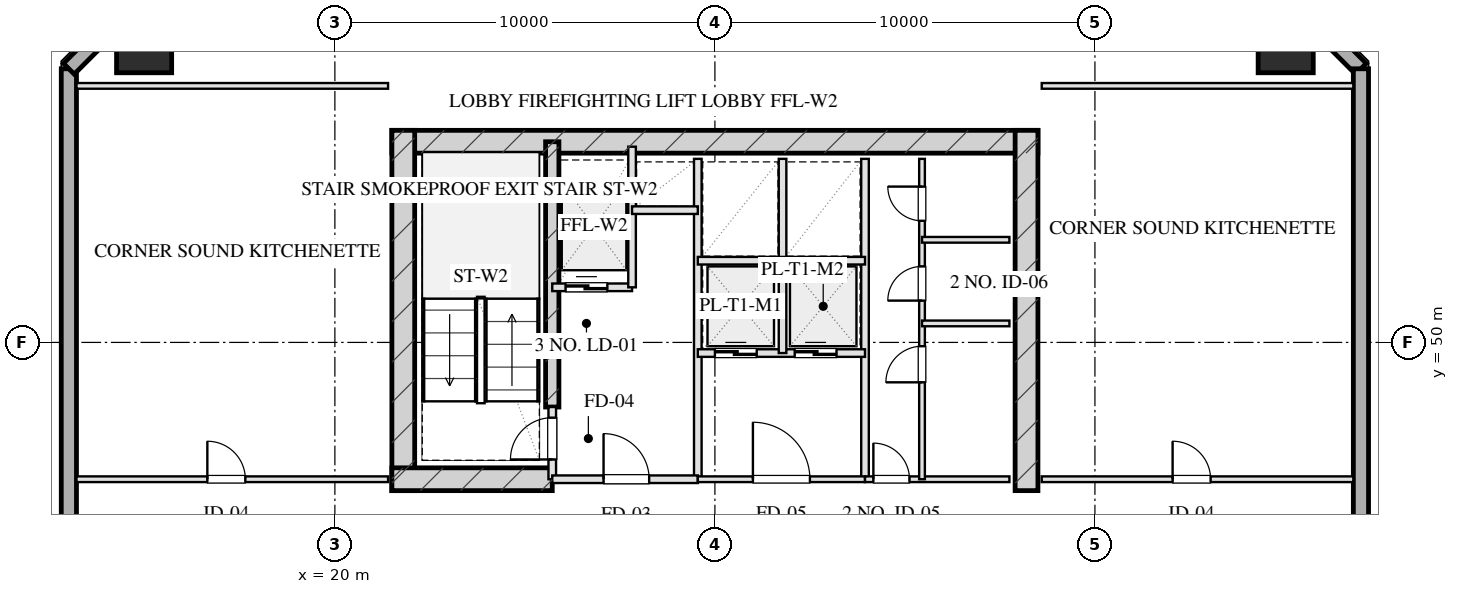
"""IFC4 building model, lengths in metres.
Left out: names, types, materials, properties, quantities, classifications, styles, units other than length and angle.
Written with IfcOpenShell. Run it as: python <this file> out.ifc"""

import sys

from ifc_helpers import new_model, si_unit, direction, frame, frame_2d, origin, origin_2d, place, context, subcontext, project, spatial, rectangle, hollow_rectangle, extrude, element, fill, save


model = new_model("IFC4")
c1 = context("Model", 3, precision=1e-05, world=origin(), true_north=direction((0.0, 1.0)))
c2 = subcontext(c1, "Body", "Model", "MODEL_VIEW")
j1 = project(units=[si_unit("LENGTHUNIT", "METRE"), si_unit("PLANEANGLEUNIT", "RADIAN")], contexts=[c1])
p1 = place(None, origin())
s1 = spatial("IfcSite", under=j1, at=p1, CompositionType="ELEMENT")
p2 = place(p1, origin())
s2 = spatial("IfcBuilding", under=s1, at=p2, CompositionType="ELEMENT")
p3 = place(p2, frame((0.0, 0.0, 173.65)))
s3 = spatial("IfcBuildingStorey", under=s2, at=p3, CompositionType="ELEMENT", Elevation=173.65)
p4 = place(p3, frame((21.5, 55.28, 0.0), z_axis=(0.0, 0.0, 1.0), x_axis=(1.0, 0.0, 0.0)))
e1 = element("IfcWall", 1, at=p4, inside=s3, PredefinedType="SHEAR", context=c2, shape_type="SweptSolid", body=[
    extrude(rectangle(XDim=17.0, YDim=0.6, at=frame_2d((8.5, 0.0))), origin(), (0.0, 0.0, 1.0), 3.45),
])
for number, where, z_axis, x_axis in (
    (2, (21.8, 46.1, 0.0), (0.0, 0.0, 1.0), (0.0, 1.0, 0.0)),
    (3, (38.2, 46.1, 0.0), (0.0, 0.0, 1.0), (0.0, 1.0, 0.0)),
):
    element("IfcWall", number, at=place(p3, frame(where, z_axis=z_axis, x_axis=x_axis)), inside=s3, PredefinedType="SHEAR", context=c2, shape_type="SweptSolid", body=[
        extrude(rectangle(XDim=9.48, YDim=0.6, at=frame_2d((4.74, 0.0))), origin(), (0.0, 0.0, 1.0), 3.45),
    ])
p5 = place(p3, frame((25.72, 48.3, 0.0), z_axis=(0.0, 0.0, 1.0), x_axis=(0.0, 1.0, 0.0)))
e4 = element("IfcWall", 4, at=p5, inside=s3, PredefinedType="SHEAR", context=c2, shape_type="SweptSolid", body=[
    extrude(rectangle(XDim=6.98, YDim=0.35, at=frame_2d((3.49, 0.0))), origin(), (0.0, 0.0, 1.0), 3.45),
])
p6 = place(p3, frame((21.5, 46.4, 0.0), z_axis=(0.0, 0.0, 1.0), x_axis=(1.0, 0.0, 0.0)))
e5 = element("IfcWall", 5, at=p6, inside=s3, PredefinedType="SHEAR", context=c2, shape_type="SweptSolid", body=[
    extrude(rectangle(XDim=4.22, YDim=0.6, at=frame_2d((2.11, 0.0))), origin(), (0.0, 0.0, 1.0), 3.45),
])
for number, where, z_axis, x_axis in (
    (6, (45.02, 57.82, 0.0), (0.0, 0.0, 1.0), (1.0, 0.0, 0.0)),
    (7, (14.98, 57.82, 0.0), (0.0, 0.0, 1.0), (1.0, 0.0, 0.0)),
):
    element("IfcColumn", number, at=place(p3, frame(where, z_axis=z_axis, x_axis=x_axis)), inside=s3, PredefinedType="COLUMN", context=c2, shape_type="SweptSolid", body=[
        extrude(hollow_rectangle(XDim=1.45, YDim=1.45, WallThickness=0.05, at=origin_2d()), origin(), (0.0, 0.0, 1.0), 3.451),
    ])
p7 = place(p3, frame((13.0, 10.8, 0.0), z_axis=(0.0, 0.0, 1.0), x_axis=(0.0, 1.0, 0.0)))
e8 = element("IfcWall", 8, at=p7, inside=s3, PredefinedType="SOLIDWALL", context=c2, shape_type="SweptSolid", body=[
    extrude(rectangle(XDim=46.4, YDim=0.4, at=frame_2d((23.2, 0.0))), origin(), (0.0, 0.0, 1.0), 2.61),
])
p8 = place(p7, frame((16.85, 0.0, 0.0)))
e9 = element("IfcOpeningElement", 9, at=p8, cuts=e8, PredefinedType="OPENING", context=c2, shape_type="SweptSolid", body=[
    extrude(rectangle(XDim=1.1, YDim=2.15, at=frame_2d((0.55, 1.075))), frame((0.0, 0.21, 0.0), z_axis=(0.0, -1.0, 0.0), x_axis=(1.0, 0.0, 0.0)), (0.0, 0.0, 1.0), 0.42),
])
for number, where, z_axis, x_axis in (
    (10, (13.0, 57.2, 0.0), (0.0, 0.0, 1.0), (0.707, 0.707, 0.0)),
    (11, (44.4, 59.8, 0.0), (0.0, 0.0, 1.0), (0.707, -0.707, 0.0)),
):
    element("IfcWall", number, at=place(p3, frame(where, z_axis=z_axis, x_axis=x_axis)), inside=s3, PredefinedType="SOLIDWALL", context=c2, shape_type="SweptSolid", body=[
        extrude(rectangle(XDim=3.677, YDim=0.4, at=frame_2d((1.838, 0.0))), origin(), (0.0, 0.0, 1.0), 2.61),
    ])
p9 = place(p3, frame((47.0, 57.2, 0.0), z_axis=(0.0, 0.0, 1.0), x_axis=(0.0, -1.0, 0.0)))
e12 = element("IfcWall", 12, at=p9, inside=s3, PredefinedType="SOLIDWALL", context=c2, shape_type="SweptSolid", body=[
    extrude(rectangle(XDim=46.4, YDim=0.4, at=frame_2d((23.2, 0.0))), origin(), (0.0, 0.0, 1.0), 2.61),
])
p10 = place(p9, frame((19.475, 0.0, 0.75)))
e13 = element("IfcOpeningElement", 13, at=p10, cuts=e12, PredefinedType="OPENING", context=c2, shape_type="SweptSolid", body=[
    extrude(rectangle(XDim=2.25, YDim=1.46, at=frame_2d((1.125, 0.73))), frame((0.0, 0.21, 0.0), z_axis=(0.0, -1.0, 0.0), x_axis=(1.0, 0.0, 0.0)), (0.0, 0.0, 1.0), 0.42),
])
p11 = place(p9, frame((15.675, 0.0, 0.75)))
e14 = element("IfcOpeningElement", 14, at=p11, cuts=e12, PredefinedType="OPENING", context=c2, shape_type="SweptSolid", body=[
    extrude(rectangle(XDim=2.25, YDim=1.46, at=frame_2d((1.125, 0.73))), frame((0.0, 0.21, 0.0), z_axis=(0.0, -1.0, 0.0), x_axis=(1.0, 0.0, 0.0)), (0.0, 0.0, 1.0), 0.42),
])
p12 = place(p9, frame((27.05, 0.0, 0.0)))
e15 = element("IfcOpeningElement", 15, at=p12, cuts=e12, PredefinedType="OPENING", context=c2, shape_type="SweptSolid", body=[
    extrude(rectangle(XDim=1.1, YDim=2.15, at=frame_2d((0.55, 1.075))), frame((0.0, 0.21, 0.0), z_axis=(0.0, -1.0, 0.0), x_axis=(1.0, 0.0, 0.0)), (0.0, 0.0, 1.0), 0.42),
])
p13 = place(p3, frame((25.72, 46.4, 0.0), z_axis=(0.0, 0.0, 1.0), x_axis=(0.0, 1.0, 0.0)))
e16 = element("IfcWall", 16, at=p13, inside=s3, PredefinedType="PARTITIONING", context=c2, shape_type="SweptSolid", body=[
    extrude(rectangle(XDim=1.9, YDim=0.2, at=frame_2d((0.95, 0.0))), origin(), (0.0, 0.0, 1.0), 3.175),
])
p14 = place(p13, frame((0.52, 0.0, 0.0)))
e17 = element("IfcOpeningElement", 17, at=p14, cuts=e16, PredefinedType="OPENING", context=c2, shape_type="SweptSolid", body=[
    extrude(rectangle(XDim=1.1, YDim=2.05, at=frame_2d((0.55, 1.025))), frame((0.0, 0.11, 0.0), z_axis=(0.0, -1.0, 0.0), x_axis=(1.0, 0.0, 0.0)), (0.0, 0.0, 1.0), 0.22),
])
p15 = place(p3, frame((29.55, 46.4, 0.0), z_axis=(0.0, 0.0, 1.0), x_axis=(0.0, 1.0, 0.0)))
e18 = element("IfcWall", 18, at=p15, inside=s3, PredefinedType="PARTITIONING", context=c2, shape_type="SweptSolid", body=[
    extrude(rectangle(XDim=8.43, YDim=0.2, at=frame_2d((4.215, 0.0))), origin(), (0.0, 0.0, 1.0), 3.175),
])
p16 = place(p3, frame((25.72, 46.4, 0.0), z_axis=(0.0, 0.0, 1.0), x_axis=(1.0, 0.0, 0.0)))
e19 = element("IfcWall", 19, at=p16, inside=s3, PredefinedType="PARTITIONING", context=c2, shape_type="SweptSolid", body=[
    extrude(rectangle(XDim=3.83, YDim=0.2, at=frame_2d((1.915, 0.0))), origin(), (0.0, 0.0, 1.0), 3.175),
])
p17 = place(p16, frame((1.35, 0.0, 0.0)))
e20 = element("IfcOpeningElement", 20, at=p17, cuts=e19, PredefinedType="OPENING", context=c2, shape_type="SweptSolid", body=[
    extrude(rectangle(XDim=1.2, YDim=2.05, at=frame_2d((0.6, 1.025))), frame((0.0, 0.11, 0.0), z_axis=(0.0, -1.0, 0.0), x_axis=(1.0, 0.0, 0.0)), (0.0, 0.0, 1.0), 0.22),
])
p18 = place(p3, frame((25.72, 51.45, 0.0), z_axis=(0.0, 0.0, 1.0), x_axis=(1.0, 0.0, 0.0)))
e21 = element("IfcWall", 21, at=p18, inside=s3, PredefinedType="PARTITIONING", context=c2, shape_type="SweptSolid", body=[
    extrude(rectangle(XDim=2.1, YDim=0.2, at=frame_2d((1.05, 0.0))), origin(), (0.0, 0.0, 1.0), 3.175),
])
p19 = place(p18, frame((0.35, 0.0, 0.0)))
e22 = element("IfcOpeningElement", 22, at=p19, cuts=e21, PredefinedType="OPENING", context=c2, shape_type="SweptSolid", body=[
    extrude(rectangle(XDim=1.1, YDim=2.05, at=frame_2d((0.55, 1.025))), frame((0.0, 0.11, 0.0), z_axis=(0.0, -1.0, 0.0), x_axis=(1.0, 0.0, 0.0)), (0.0, 0.0, 1.0), 0.22),
])
p20 = place(p3, frame((27.82, 51.45, 0.0), z_axis=(0.0, 0.0, 1.0), x_axis=(0.0, 1.0, 0.0)))
e23 = element("IfcWall", 23, at=p20, inside=s3, PredefinedType="PARTITIONING", context=c2, shape_type="SweptSolid", body=[
    extrude(rectangle(XDim=3.7, YDim=0.2, at=frame_2d((1.85, 0.0))), origin(), (0.0, 0.0, 1.0), 3.175),
])
p21 = place(p3, frame((27.82, 53.48, 0.0), z_axis=(0.0, 0.0, 1.0), x_axis=(1.0, 0.0, 0.0)))
e24 = element("IfcWall", 24, at=p21, inside=s3, PredefinedType="PARTITIONING", context=c2, shape_type="SweptSolid", body=[
    extrude(rectangle(XDim=1.73, YDim=0.2, at=frame_2d((0.865, 0.0))), origin(), (0.0, 0.0, 1.0), 3.175),
])
p22 = place(p3, frame((33.95, 46.4, 0.0), z_axis=(0.0, 0.0, 1.0), x_axis=(0.0, 1.0, 0.0)))
e25 = element("IfcWall", 25, at=p22, inside=s3, PredefinedType="PARTITIONING", context=c2, shape_type="SweptSolid", body=[
    extrude(rectangle(XDim=8.43, YDim=0.2, at=frame_2d((4.215, 0.0))), origin(), (0.0, 0.0, 1.0), 3.175),
])
p23 = place(p3, frame((29.55, 46.4, 0.0), z_axis=(0.0, 0.0, 1.0), x_axis=(1.0, 0.0, 0.0)))
e26 = element("IfcWall", 26, at=p23, inside=s3, PredefinedType="PARTITIONING", context=c2, shape_type="SweptSolid", body=[
    extrude(rectangle(XDim=4.4, YDim=0.15, at=frame_2d((2.2, 0.0))), origin(), (0.0, 0.0, 1.0), 3.175),
])
p24 = place(p23, frame((1.45, 0.0, 0.0)))
e27 = element("IfcOpeningElement", 27, at=p24, cuts=e26, PredefinedType="OPENING", context=c2, shape_type="SweptSolid", body=[
    extrude(rectangle(XDim=1.5, YDim=2.05, at=frame_2d((0.75, 1.025))), frame((0.0, 0.085, 0.0), z_axis=(0.0, -1.0, 0.0), x_axis=(1.0, 0.0, 0.0)), (0.0, 0.0, 1.0), 0.17),
])
p25 = place(p3, frame((29.55, 49.72, 0.0), z_axis=(0.0, 0.0, 1.0), x_axis=(1.0, 0.0, 0.0)))
e28 = element("IfcWall", 28, at=p25, inside=s3, PredefinedType="PARTITIONING", context=c2, shape_type="SweptSolid", body=[
    extrude(rectangle(XDim=4.4, YDim=0.2, at=frame_2d((2.2, 0.0))), origin(), (0.0, 0.0, 1.0), 3.175),
])
p26 = place(p25, frame((0.45, 0.0, 0.0)))
e29 = element("IfcOpeningElement", 29, at=p26, cuts=e28, PredefinedType="OPENING", context=c2, shape_type="SweptSolid", body=[
    extrude(rectangle(XDim=1.1, YDim=2.05, at=frame_2d((0.55, 1.025))), frame((0.0, 0.11, 0.0), z_axis=(0.0, -1.0, 0.0), x_axis=(1.0, 0.0, 0.0)), (0.0, 0.0, 1.0), 0.22),
])
p27 = place(p25, frame((2.55, 0.0, 0.0)))
e30 = element("IfcOpeningElement", 30, at=p27, cuts=e28, PredefinedType="OPENING", context=c2, shape_type="SweptSolid", body=[
    extrude(rectangle(XDim=1.1, YDim=2.05, at=frame_2d((0.55, 1.025))), frame((0.0, 0.11, 0.0), z_axis=(0.0, -1.0, 0.0), x_axis=(1.0, 0.0, 0.0)), (0.0, 0.0, 1.0), 0.22),
])
p28 = place(p3, frame((31.78, 49.72, 0.0), z_axis=(0.0, 0.0, 1.0), x_axis=(0.0, 1.0, 0.0)))
e31 = element("IfcWall", 31, at=p28, inside=s3, PredefinedType="PARTITIONING", context=c2, shape_type="SweptSolid", body=[
    extrude(rectangle(XDim=5.11, YDim=0.2, at=frame_2d((2.555, 0.0))), origin(), (0.0, 0.0, 1.0), 3.175),
])
p29 = place(p3, frame((29.55, 52.15, 0.0), z_axis=(0.0, 0.0, 1.0), x_axis=(1.0, 0.0, 0.0)))
e32 = element("IfcWall", 32, at=p29, inside=s3, PredefinedType="PARTITIONING", context=c2, shape_type="SweptSolid", body=[
    extrude(rectangle(XDim=4.4, YDim=0.2, at=frame_2d((2.2, 0.0))), origin(), (0.0, 0.0, 1.0), 3.175),
])
p30 = place(p3, frame((33.95, 46.4, 0.0), z_axis=(0.0, 0.0, 1.0), x_axis=(1.0, 0.0, 0.0)))
e33 = element("IfcWall", 33, at=p30, inside=s3, PredefinedType="PARTITIONING", context=c2, shape_type="SweptSolid", body=[
    extrude(rectangle(XDim=3.8, YDim=0.15, at=frame_2d((1.9, 0.0))), origin(), (0.0, 0.0, 1.0), 3.175),
])
p31 = place(p30, frame((0.22, 0.0, 0.0)))
e34 = element("IfcOpeningElement", 34, at=p31, cuts=e33, PredefinedType="OPENING", context=c2, shape_type="SweptSolid", body=[
    extrude(rectangle(XDim=0.95, YDim=2.05, at=frame_2d((0.475, 1.025))), frame((0.0, 0.085, 0.0), z_axis=(0.0, -1.0, 0.0), x_axis=(1.0, 0.0, 0.0)), (0.0, 0.0, 1.0), 0.17),
])
p32 = place(p3, frame((35.45, 46.4, 0.0), z_axis=(0.0, 0.0, 1.0), x_axis=(0.0, 1.0, 0.0)))
e35 = element("IfcWall", 35, at=p32, inside=s3, PredefinedType="PARTITIONING", context=c2, shape_type="SweptSolid", body=[
    extrude(rectangle(XDim=8.43, YDim=0.15, at=frame_2d((4.215, 0.0))), origin(), (0.0, 0.0, 1.0), 2.765),
])
p33 = place(p32, frame((2.55, 0.0, 0.0)))
e36 = element("IfcOpeningElement", 36, at=p33, cuts=e35, PredefinedType="OPENING", context=c2, shape_type="SweptSolid", body=[
    extrude(rectangle(XDim=0.95, YDim=2.05, at=frame_2d((0.475, 1.025))), frame((0.0, 0.085, 0.0), z_axis=(0.0, -1.0, 0.0), x_axis=(1.0, 0.0, 0.0)), (0.0, 0.0, 1.0), 0.17),
])
p34 = place(p32, frame((4.7, 0.0, 0.0)))
e37 = element("IfcOpeningElement", 37, at=p34, cuts=e35, PredefinedType="OPENING", context=c2, shape_type="SweptSolid", body=[
    extrude(rectangle(XDim=0.9, YDim=2.05, at=frame_2d((0.45, 1.025))), frame((0.0, 0.085, 0.0), z_axis=(0.0, -1.0, 0.0), x_axis=(1.0, 0.0, 0.0)), (0.0, 0.0, 1.0), 0.17),
])
p35 = place(p32, frame((6.8, 0.0, 0.0)))
e38 = element("IfcOpeningElement", 38, at=p35, cuts=e35, PredefinedType="OPENING", context=c2, shape_type="SweptSolid", body=[
    extrude(rectangle(XDim=0.9, YDim=2.05, at=frame_2d((0.45, 1.025))), frame((0.0, 0.085, 0.0), z_axis=(0.0, -1.0, 0.0), x_axis=(1.0, 0.0, 0.0)), (0.0, 0.0, 1.0), 0.17),
])
for number, where, z_axis, x_axis in (
    (39, (35.45, 50.5, 0.0), (0.0, 0.0, 1.0), (1.0, 0.0, 0.0)),
    (40, (35.45, 52.7, 0.0), (0.0, 0.0, 1.0), (1.0, 0.0, 0.0)),
):
    element("IfcWall", number, at=place(p3, frame(where, z_axis=z_axis, x_axis=x_axis)), inside=s3, PredefinedType="PARTITIONING", context=c2, shape_type="SweptSolid", body=[
        extrude(rectangle(XDim=2.3, YDim=0.15, at=frame_2d((1.15, 0.0))), origin(), (0.0, 0.0, 1.0), 3.175),
    ])
p36 = place(p3, frame((13.2, 56.75, 0.0), z_axis=(0.0, 0.0, 1.0), x_axis=(1.0, 0.0, 0.0)))
e41 = element("IfcWall", 41, at=p36, inside=s3, PredefinedType="PARTITIONING", context=c2, shape_type="SweptSolid", body=[
    extrude(rectangle(XDim=8.2, YDim=0.15, at=frame_2d((4.1, 0.0))), origin(), (0.0, 0.0, 1.0), 3.175),
])
p37 = place(p3, frame((13.2, 46.4, 0.0), z_axis=(0.0, 0.0, 1.0), x_axis=(1.0, 0.0, 0.0)))
e42 = element("IfcWall", 42, at=p37, inside=s3, PredefinedType="PARTITIONING", context=c2, shape_type="SweptSolid", body=[
    extrude(rectangle(XDim=8.2, YDim=0.15, at=frame_2d((4.1, 0.0))), origin(), (0.0, 0.0, 1.0), 3.175),
])
p38 = place(p37, frame((3.444, 0.0, 0.0)))
e43 = element("IfcOpeningElement", 43, at=p38, cuts=e42, PredefinedType="OPENING", context=c2, shape_type="SweptSolid", body=[
    extrude(rectangle(XDim=1.0, YDim=2.05, at=frame_2d((0.5, 1.025))), frame((0.0, 0.085, 0.0), z_axis=(0.0, -1.0, 0.0), x_axis=(1.0, 0.0, 0.0)), (0.0, 0.0, 1.0), 0.17),
])
p39 = place(p3, frame((38.6, 56.75, 0.0), z_axis=(0.0, 0.0, 1.0), x_axis=(1.0, 0.0, 0.0)))
e44 = element("IfcWall", 44, at=p39, inside=s3, PredefinedType="PARTITIONING", context=c2, shape_type="SweptSolid", body=[
    extrude(rectangle(XDim=8.2, YDim=0.15, at=frame_2d((4.1, 0.0))), origin(), (0.0, 0.0, 1.0), 3.175),
])
p40 = place(p3, frame((38.6, 46.4, 0.0), z_axis=(0.0, 0.0, 1.0), x_axis=(1.0, 0.0, 0.0)))
e45 = element("IfcWall", 45, at=p40, inside=s3, PredefinedType="PARTITIONING", context=c2, shape_type="SweptSolid", body=[
    extrude(rectangle(XDim=8.2, YDim=0.15, at=frame_2d((4.1, 0.0))), origin(), (0.0, 0.0, 1.0), 3.175),
])
p41 = place(p40, frame((3.444, 0.0, 0.0)))
e46 = element("IfcOpeningElement", 46, at=p41, cuts=e45, PredefinedType="OPENING", context=c2, shape_type="SweptSolid", body=[
    extrude(rectangle(XDim=1.0, YDim=2.05, at=frame_2d((0.5, 1.025))), frame((0.0, 0.085, 0.0), z_axis=(0.0, -1.0, 0.0), x_axis=(1.0, 0.0, 0.0)), (0.0, 0.0, 1.0), 0.17),
])
p42 = place(p14, origin())
e47 = element("IfcDoor", 47, at=p42, inside=s3, OperationType="SINGLE_SWING_LEFT", PredefinedType="DOOR", context=c2, shape_type="SweptSolid", body=[
    extrude(rectangle(XDim=1.1, YDim=2.05, at=frame_2d((0.55, 1.025))), frame((0.0, 0.025, 0.0), z_axis=(0.0, -1.0, 0.0), x_axis=(1.0, 0.0, 0.0)), (0.0, 0.0, 1.0), 0.05),
])
fill(e17, e47)
p43 = place(p17, origin())
e48 = element("IfcDoor", 48, at=p43, inside=s3, OperationType="SINGLE_SWING_LEFT", PredefinedType="DOOR", context=c2, shape_type="SweptSolid", body=[
    extrude(rectangle(XDim=1.2, YDim=2.05, at=frame_2d((0.6, 1.025))), frame((0.0, 0.025, 0.0), z_axis=(0.0, -1.0, 0.0), x_axis=(1.0, 0.0, 0.0)), (0.0, 0.0, 1.0), 0.05),
])
fill(e20, e48)
p44 = place(p19, origin())
e49 = element("IfcDoor", 49, at=p44, inside=s3, OperationType="DOUBLE_DOOR_SLIDING", PredefinedType="DOOR", context=c2, shape_type="SweptSolid", body=[
    extrude(rectangle(XDim=1.1, YDim=2.05, at=frame_2d((0.55, 1.025))), frame((0.0, 0.025, 0.0), z_axis=(0.0, -1.0, 0.0), x_axis=(1.0, 0.0, 0.0)), (0.0, 0.0, 1.0), 0.05),
])
fill(e22, e49)
p45 = place(p24, origin())
e50 = element("IfcDoor", 50, at=p45, inside=s3, OperationType="SINGLE_SWING_LEFT", PredefinedType="DOOR", context=c2, shape_type="SweptSolid", body=[
    extrude(rectangle(XDim=1.5, YDim=2.05, at=frame_2d((0.75, 1.025))), frame((0.0, 0.025, 0.0), z_axis=(0.0, -1.0, 0.0), x_axis=(1.0, 0.0, 0.0)), (0.0, 0.0, 1.0), 0.05),
])
fill(e27, e50)
p46 = place(p26, origin())
e51 = element("IfcDoor", 51, at=p46, inside=s3, OperationType="DOUBLE_DOOR_SLIDING", PredefinedType="DOOR", context=c2, shape_type="SweptSolid", body=[
    extrude(rectangle(XDim=1.1, YDim=2.05, at=frame_2d((0.55, 1.025))), frame((0.0, 0.025, 0.0), z_axis=(0.0, -1.0, 0.0), x_axis=(1.0, 0.0, 0.0)), (0.0, 0.0, 1.0), 0.05),
])
fill(e29, e51)
p47 = place(p27, origin())
e52 = element("IfcDoor", 52, at=p47, inside=s3, OperationType="DOUBLE_DOOR_SLIDING", PredefinedType="DOOR", context=c2, shape_type="SweptSolid", body=[
    extrude(rectangle(XDim=1.1, YDim=2.05, at=frame_2d((0.55, 1.025))), frame((0.0, 0.025, 0.0), z_axis=(0.0, -1.0, 0.0), x_axis=(1.0, 0.0, 0.0)), (0.0, 0.0, 1.0), 0.05),
])
fill(e30, e52)
p48 = place(p31, origin())
e53 = element("IfcDoor", 53, at=p48, inside=s3, OperationType="SINGLE_SWING_LEFT", PredefinedType="DOOR", context=c2, shape_type="SweptSolid", body=[
    extrude(rectangle(XDim=0.95, YDim=2.05, at=frame_2d((0.475, 1.025))), frame((0.0, 0.025, 0.0), z_axis=(0.0, -1.0, 0.0), x_axis=(1.0, 0.0, 0.0)), (0.0, 0.0, 1.0), 0.05),
])
fill(e34, e53)
p49 = place(p33, origin())
e54 = element("IfcDoor", 54, at=p49, inside=s3, OperationType="SINGLE_SWING_LEFT", PredefinedType="DOOR", context=c2, shape_type="SweptSolid", body=[
    extrude(rectangle(XDim=0.95, YDim=2.05, at=frame_2d((0.475, 1.025))), frame((0.0, 0.025, 0.0), z_axis=(0.0, -1.0, 0.0), x_axis=(1.0, 0.0, 0.0)), (0.0, 0.0, 1.0), 0.05),
])
fill(e36, e54)
p50 = place(p34, origin())
e55 = element("IfcDoor", 55, at=p50, inside=s3, OperationType="SINGLE_SWING_LEFT", PredefinedType="DOOR", context=c2, shape_type="SweptSolid", body=[
    extrude(rectangle(XDim=0.9, YDim=2.05, at=frame_2d((0.45, 1.025))), frame((0.0, 0.025, 0.0), z_axis=(0.0, -1.0, 0.0), x_axis=(1.0, 0.0, 0.0)), (0.0, 0.0, 1.0), 0.05),
])
fill(e37, e55)
p51 = place(p35, origin())
e56 = element("IfcDoor", 56, at=p51, inside=s3, OperationType="SINGLE_SWING_RIGHT", PredefinedType="DOOR", context=c2, shape_type="SweptSolid", body=[
    extrude(rectangle(XDim=0.9, YDim=2.05, at=frame_2d((0.45, 1.025))), frame((0.0, 0.025, 0.0), z_axis=(0.0, -1.0, 0.0), x_axis=(1.0, 0.0, 0.0)), (0.0, 0.0, 1.0), 0.05),
])
fill(e38, e56)
p52 = place(p38, origin())
e57 = element("IfcDoor", 57, at=p52, inside=s3, OperationType="SINGLE_SWING_LEFT", PredefinedType="DOOR", context=c2, shape_type="SweptSolid", body=[
    extrude(rectangle(XDim=1.0, YDim=2.05, at=frame_2d((0.5, 1.025))), frame((0.0, 0.025, 0.0), z_axis=(0.0, -1.0, 0.0), x_axis=(1.0, 0.0, 0.0)), (0.0, 0.0, 1.0), 0.05),
])
fill(e43, e57)
p53 = place(p41, origin())
e58 = element("IfcDoor", 58, at=p53, inside=s3, OperationType="SINGLE_SWING_LEFT", PredefinedType="DOOR", context=c2, shape_type="SweptSolid", body=[
    extrude(rectangle(XDim=1.0, YDim=2.05, at=frame_2d((0.5, 1.025))), frame((0.0, 0.025, 0.0), z_axis=(0.0, -1.0, 0.0), x_axis=(1.0, 0.0, 0.0)), (0.0, 0.0, 1.0), 0.05),
])
fill(e46, e58)
save(model, sys.argv[1])
